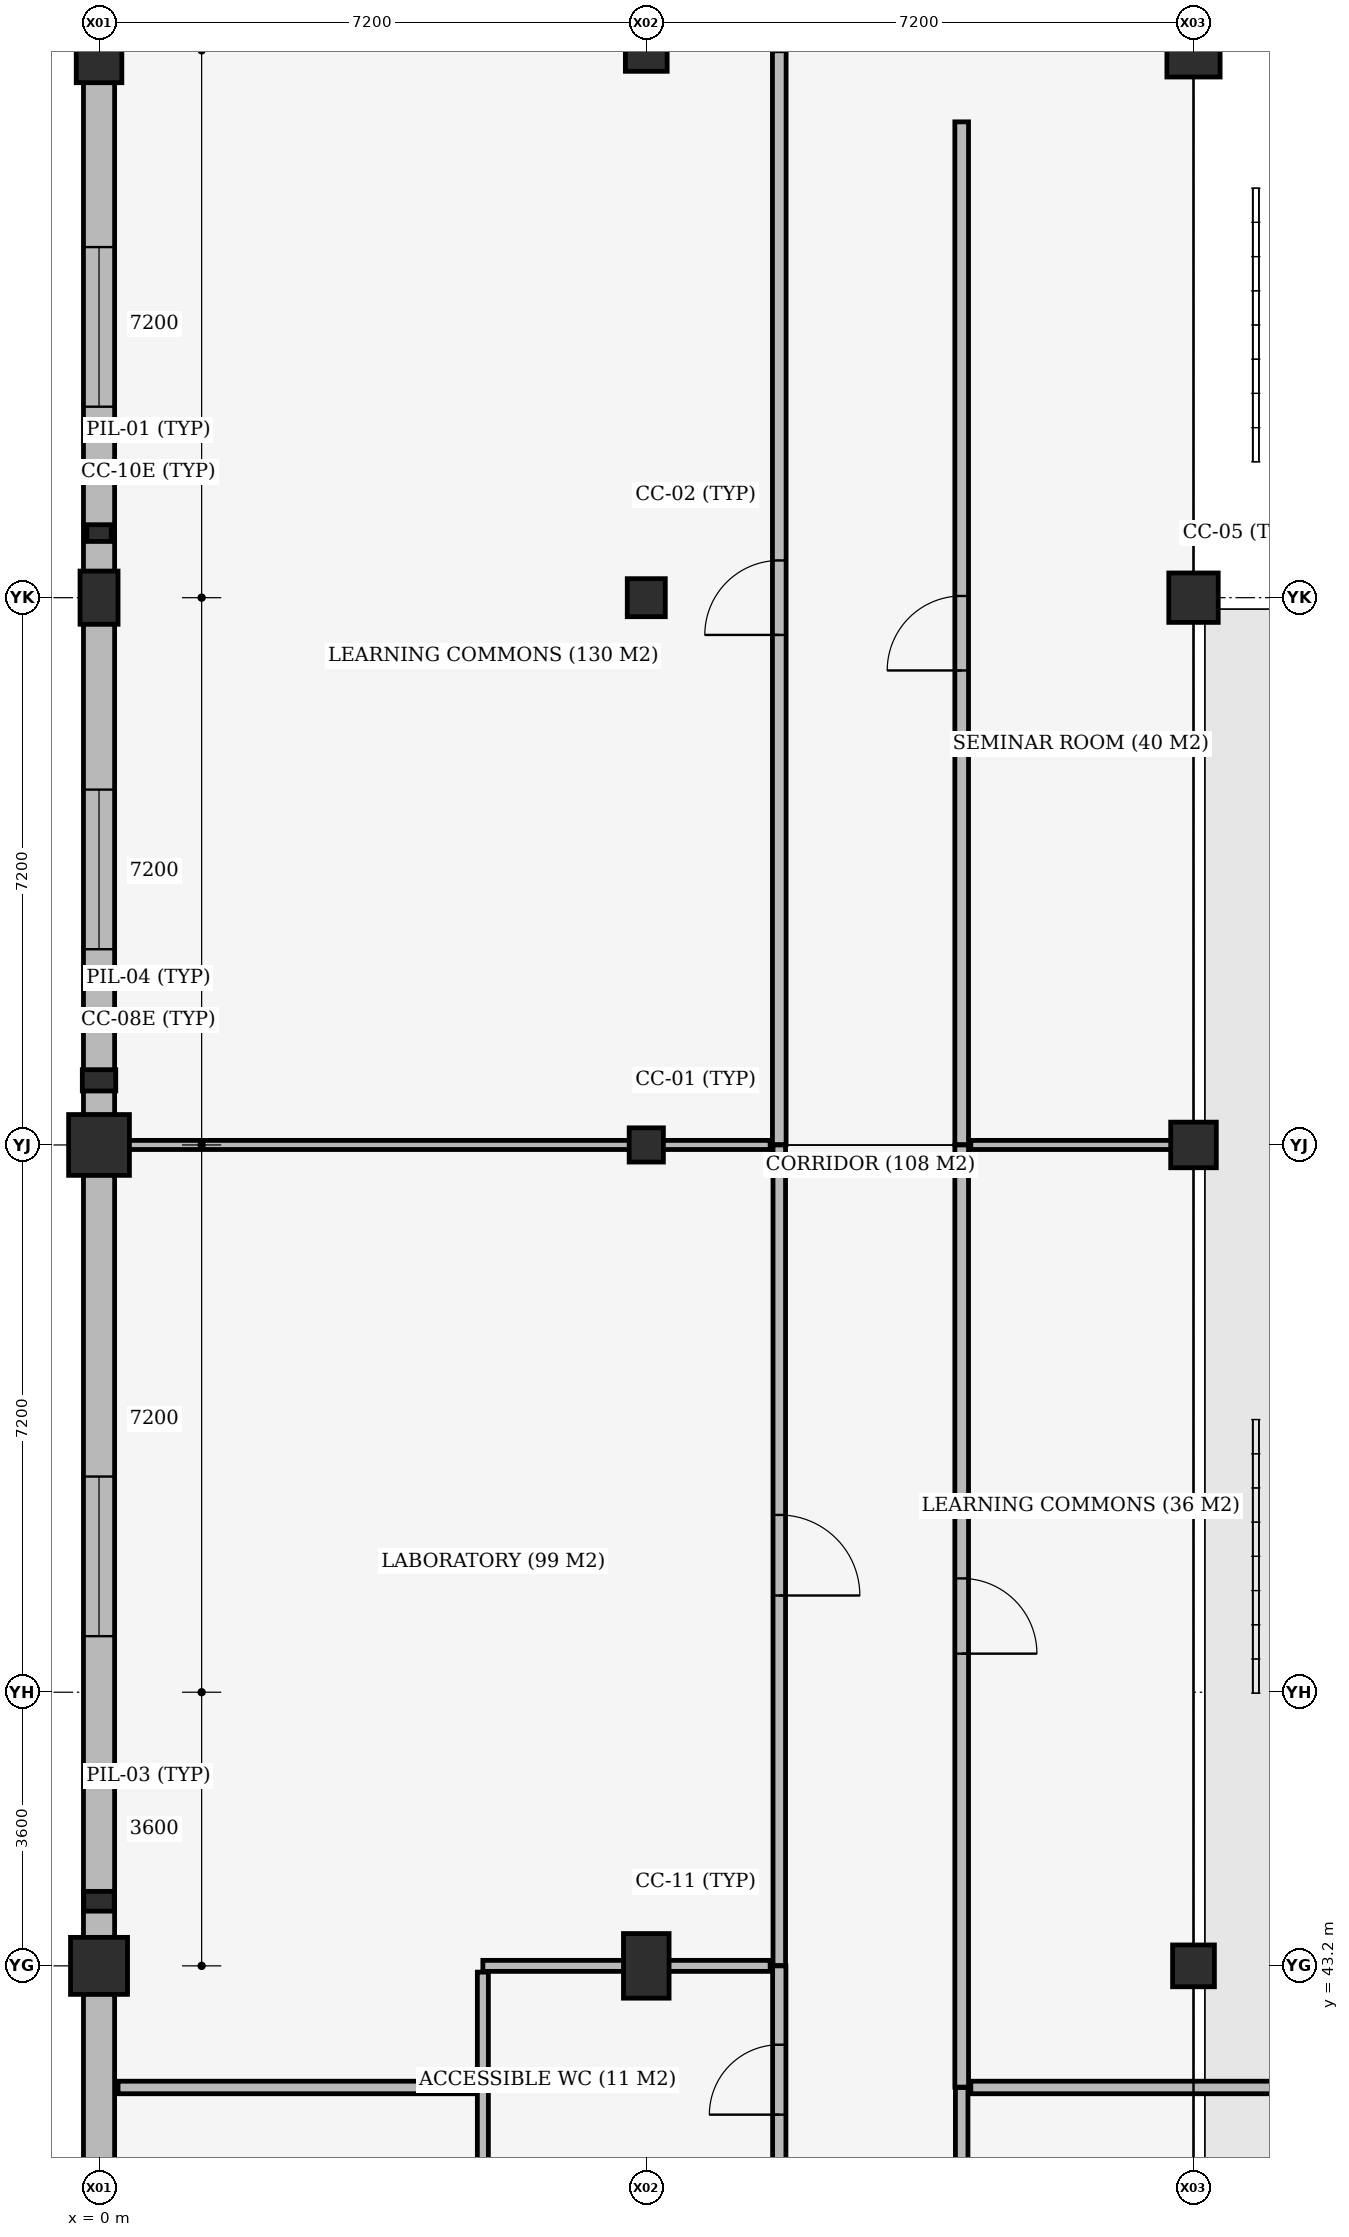
"""IFC4 building model, lengths in metres.
Left out: names, types, materials, properties, quantities, classifications, styles, units other than length and angle.
Written with IfcOpenShell. Run it as: python <this file> out.ifc"""

import sys

from ifc_helpers import new_model, si_unit, direction, frame, frame_2d, origin, origin_2d, place, context, subcontext, project, spatial, rectangle, extrude, element, fill, save


model = new_model("IFC4")
c1 = context("Model", 3, precision=1e-05, world=origin(), true_north=direction((0.0, 1.0)))
c2 = subcontext(c1, "Body", "Model", "MODEL_VIEW")
j1 = project(units=[si_unit("LENGTHUNIT", "METRE"), si_unit("PLANEANGLEUNIT", "RADIAN")], contexts=[c1])
p1 = place(None, origin())
s1 = spatial("IfcSite", under=j1, at=p1, CompositionType="ELEMENT")
p2 = place(p1, origin())
s2 = spatial("IfcBuilding", under=s1, at=p2, CompositionType="ELEMENT")
p3 = place(p2, origin())
s3 = spatial("IfcBuildingStorey", under=s2, at=p3, CompositionType="ELEMENT", Elevation=0.0)
p4 = place(p3, frame((0.0, 43.2, 0.0), z_axis=(0.0, 0.0, 1.0), x_axis=(1.0, 0.0, 0.0)))
e1 = element("IfcColumn", 1, at=p4, inside=s3, PredefinedType="COLUMN", context=c2, shape_type="SweptSolid", body=[
    extrude(rectangle(XDim=0.75, YDim=0.75, at=origin_2d()), origin(), (0.0, 0.0, 1.0), 5.1),
])
p5 = place(p3, frame((0.0, 54.0, 0.0), z_axis=(0.0, 0.0, 1.0), x_axis=(1.0, 0.0, 0.0)))
e2 = element("IfcColumn", 2, at=p5, inside=s3, PredefinedType="COLUMN", context=c2, shape_type="SweptSolid", body=[
    extrude(rectangle(XDim=0.8, YDim=0.8, at=origin_2d()), origin(), (0.0, 0.0, 1.0), 5.1),
])
p6 = place(p3, frame((0.0, 61.2, 0.0), z_axis=(0.0, 0.0, 1.0), x_axis=(1.0, 0.0, 0.0)))
e3 = element("IfcColumn", 3, at=p6, inside=s3, PredefinedType="COLUMN", context=c2, shape_type="SweptSolid", body=[
    extrude(rectangle(XDim=0.5, YDim=0.7, at=origin_2d()), origin(), (0.0, 0.0, 1.0), 5.1),
])
for number, where, z_axis, x_axis in (
    (4, (0.0, 68.4, 0.0), (0.0, 0.0, 1.0), (1.0, 0.0, 0.0)),
    (5, (7.2, 43.2, 0.0), (0.0, 0.0, 1.0), (1.0, 0.0, 0.0)),
):
    element("IfcColumn", number, at=place(p3, frame(where, z_axis=z_axis, x_axis=x_axis)), inside=s3, PredefinedType="COLUMN", context=c2, shape_type="SweptSolid", body=[
        extrude(rectangle(XDim=0.6, YDim=0.85, at=origin_2d()), origin(), (0.0, 0.0, 1.0), 5.1),
    ])
p7 = place(p3, frame((7.2, 54.0, 0.0), z_axis=(0.0, 0.0, 1.0), x_axis=(1.0, 0.0, 0.0)))
e6 = element("IfcColumn", 6, at=p7, inside=s3, PredefinedType="COLUMN", context=c2, shape_type="SweptSolid", body=[
    extrude(rectangle(XDim=0.45, YDim=0.45, at=origin_2d()), origin(), (0.0, 0.0, 1.0), 5.1),
])
p8 = place(p3, frame((7.2, 61.2, 0.0), z_axis=(0.0, 0.0, 1.0), x_axis=(1.0, 0.0, 0.0)))
e7 = element("IfcColumn", 7, at=p8, inside=s3, PredefinedType="COLUMN", context=c2, shape_type="SweptSolid", body=[
    extrude(rectangle(XDim=0.5, YDim=0.5, at=origin_2d()), origin(), (0.0, 0.0, 1.0), 5.1),
])
for number, where, z_axis, x_axis in (
    (8, (7.2, 68.4, 0.0), (0.0, 0.0, 1.0), (1.0, 0.0, 0.0)),
    (9, (14.4, 43.2, 0.0), (0.0, 0.0, 1.0), (1.0, 0.0, 0.0)),
):
    element("IfcColumn", number, at=place(p3, frame(where, z_axis=z_axis, x_axis=x_axis)), inside=s3, PredefinedType="COLUMN", context=c2, shape_type="SweptSolid", body=[
        extrude(rectangle(XDim=0.55, YDim=0.55, at=origin_2d()), origin(), (0.0, 0.0, 1.0), 5.1),
    ])
p9 = place(p3, frame((14.4, 54.0, 0.0), z_axis=(0.0, 0.0, 1.0), x_axis=(1.0, 0.0, 0.0)))
e10 = element("IfcColumn", 10, at=p9, inside=s3, PredefinedType="COLUMN", context=c2, shape_type="SweptSolid", body=[
    extrude(rectangle(XDim=0.6, YDim=0.6, at=origin_2d()), origin(), (0.0, 0.0, 1.0), 5.1),
])
p10 = place(p3, frame((14.4, 61.2, 0.0), z_axis=(0.0, 0.0, 1.0), x_axis=(1.0, 0.0, 0.0)))
e11 = element("IfcColumn", 11, at=p10, inside=s3, PredefinedType="COLUMN", context=c2, shape_type="SweptSolid", body=[
    extrude(rectangle(XDim=0.65, YDim=0.65, at=origin_2d()), origin(), (0.0, 0.0, 1.0), 5.1),
])
p11 = place(p3, frame((14.4, 68.4, 0.0), z_axis=(0.0, 0.0, 1.0), x_axis=(1.0, 0.0, 0.0)))
e12 = element("IfcColumn", 12, at=p11, inside=s3, PredefinedType="COLUMN", context=c2, shape_type="SweptSolid", body=[
    extrude(rectangle(XDim=0.7, YDim=0.7, at=origin_2d()), origin(), (0.0, 0.0, 1.0), 5.1),
])
p12 = place(p3, frame((0.0, 44.05, 0.0), z_axis=(0.0, 0.0, 1.0), x_axis=(1.0, 0.0, 0.0)))
e13 = element("IfcColumn", 13, at=p12, inside=s3, PredefinedType="PILASTER", context=c2, shape_type="SweptSolid", body=[
    extrude(rectangle(XDim=0.4, YDim=0.26, at=origin_2d()), origin(), (0.0, 0.0, 1.0), 5.1),
])
p13 = place(p3, frame((0.0, 54.85, 0.0), z_axis=(0.0, 0.0, 1.0), x_axis=(1.0, 0.0, 0.0)))
e14 = element("IfcColumn", 14, at=p13, inside=s3, PredefinedType="PILASTER", context=c2, shape_type="SweptSolid", body=[
    extrude(rectangle(XDim=0.44, YDim=0.28, at=origin_2d()), origin(), (0.0, 0.0, 1.0), 5.1),
])
p14 = place(p3, frame((0.0, 62.05, 0.0), z_axis=(0.0, 0.0, 1.0), x_axis=(1.0, 0.0, 0.0)))
e15 = element("IfcColumn", 15, at=p14, inside=s3, PredefinedType="PILASTER", context=c2, shape_type="SweptSolid", body=[
    extrude(rectangle(XDim=0.32, YDim=0.22, at=origin_2d()), origin(), (0.0, 0.0, 1.0), 5.1),
])
p15 = place(p3, frame((0.0, 36.342, 0.0), z_axis=(0.0, 0.0, 1.0), x_axis=(0.0, 1.0, 0.0)))
e16 = element("IfcWall", 16, at=p15, inside=s3, PredefinedType="STANDARD", context=c2, shape_type="SweptSolid", body=[
    extrude(rectangle(XDim=6.491, YDim=0.41, at=frame_2d((3.246, 0.0))), origin(), (0.0, 0.0, 1.0), 4.3),
])
p16 = place(p15, frame((2.196, 0.0, 0.8)))
e17 = element("IfcOpeningElement", 17, at=p16, cuts=e16, PredefinedType="OPENING", context=c2, shape_type="SweptSolid", body=[
    extrude(rectangle(XDim=2.1, YDim=3.0, at=frame_2d((1.05, 1.5))), frame((0.0, 0.215, 0.0), z_axis=(0.0, -1.0, 0.0), x_axis=(1.0, 0.0, 0.0)), (0.0, 0.0, 1.0), 0.43),
])
p17 = place(p3, frame((0.0, 43.567, 0.0), z_axis=(0.0, 0.0, 1.0), x_axis=(0.0, 1.0, 0.0)))
e18 = element("IfcWall", 18, at=p17, inside=s3, PredefinedType="STANDARD", context=c2, shape_type="SweptSolid", body=[
    extrude(rectangle(XDim=10.041, YDim=0.41, at=frame_2d((5.021, 0.0))), origin(), (0.0, 0.0, 1.0), 4.5),
])
p18 = place(p17, frame((3.97, 0.0, 0.8)))
e19 = element("IfcOpeningElement", 19, at=p18, cuts=e18, PredefinedType="OPENING", context=c2, shape_type="SweptSolid", body=[
    extrude(rectangle(XDim=2.1, YDim=3.0, at=frame_2d((1.05, 1.5))), frame((0.0, 0.215, 0.0), z_axis=(0.0, -1.0, 0.0), x_axis=(1.0, 0.0, 0.0)), (0.0, 0.0, 1.0), 0.43),
])
p19 = place(p3, frame((0.0, 54.392, 0.0), z_axis=(0.0, 0.0, 1.0), x_axis=(0.0, 1.0, 0.0)))
e20 = element("IfcWall", 20, at=p19, inside=s3, PredefinedType="STANDARD", context=c2, shape_type="SweptSolid", body=[
    extrude(rectangle(XDim=6.466, YDim=0.41, at=frame_2d((3.233, 0.0))), origin(), (0.0, 0.0, 1.0), 4.45),
])
p20 = place(p19, frame((2.183, 0.0, 0.8)))
e21 = element("IfcOpeningElement", 21, at=p20, cuts=e20, PredefinedType="OPENING", context=c2, shape_type="SweptSolid", body=[
    extrude(rectangle(XDim=2.1, YDim=3.0, at=frame_2d((1.05, 1.5))), frame((0.0, 0.215, 0.0), z_axis=(0.0, -1.0, 0.0), x_axis=(1.0, 0.0, 0.0)), (0.0, 0.0, 1.0), 0.43),
])
p21 = place(p3, frame((0.0, 61.542, 0.0), z_axis=(0.0, 0.0, 1.0), x_axis=(0.0, 1.0, 0.0)))
e22 = element("IfcWall", 22, at=p21, inside=s3, PredefinedType="STANDARD", context=c2, shape_type="SweptSolid", body=[
    extrude(rectangle(XDim=6.441, YDim=0.41, at=frame_2d((3.22, 0.0))), origin(), (0.0, 0.0, 1.0), 4.4),
])
p22 = place(p21, frame((2.17, 0.0, 0.8)))
e23 = element("IfcOpeningElement", 23, at=p22, cuts=e22, PredefinedType="OPENING", context=c2, shape_type="SweptSolid", body=[
    extrude(rectangle(XDim=2.1, YDim=3.0, at=frame_2d((1.05, 1.5))), frame((0.0, 0.215, 0.0), z_axis=(0.0, -1.0, 0.0), x_axis=(1.0, 0.0, 0.0)), (0.0, 0.0, 1.0), 0.43),
])
p23 = place(p3, frame((8.95, 40.205, 0.0), z_axis=(0.0, 0.0, 1.0), x_axis=(0.0, 1.0, 0.0)))
e24 = element("IfcWall", 24, at=p23, inside=s3, PredefinedType="PLUMBINGWALL", context=c2, shape_type="SweptSolid", body=[
    extrude(rectangle(XDim=2.995, YDim=0.175, at=frame_2d((1.498, 0.0))), origin(), (0.0, 0.0, 1.0), 4.3),
])
p24 = place(p23, frame((1.038, 0.0, 0.0)))
e25 = element("IfcOpeningElement", 25, at=p24, cuts=e24, PredefinedType="OPENING", context=c2, shape_type="SweptSolid", body=[
    extrude(rectangle(XDim=0.92, YDim=2.1, at=frame_2d((0.46, 1.05))), frame((0.0, 0.097, 0.0), z_axis=(0.0, -1.0, 0.0), x_axis=(1.0, 0.0, 0.0)), (0.0, 0.0, 1.0), 0.195),
])
p25 = place(p3, frame((5.05, 43.2, 0.0), z_axis=(0.0, 0.0, 1.0), x_axis=(1.0, 0.0, 0.0)))
e26 = element("IfcWall", 26, at=p25, inside=s3, PredefinedType="PLUMBINGWALL", context=c2, shape_type="SweptSolid", body=[
    extrude(rectangle(XDim=3.78, YDim=0.145, at=frame_2d((1.89, 0.0))), origin(), (0.0, 0.0, 1.0), 4.3),
])
p26 = place(p3, frame((5.05, 40.282, 0.0), z_axis=(0.0, 0.0, 1.0), x_axis=(0.0, 1.0, 0.0)))
e27 = element("IfcWall", 27, at=p26, inside=s3, PredefinedType="PLUMBINGWALL", context=c2, shape_type="SweptSolid", body=[
    extrude(rectangle(XDim=2.835, YDim=0.145, at=frame_2d((1.417, 0.0))), origin(), (0.0, 0.0, 1.0), 4.35),
])
p27 = place(p3, frame((0.25, 41.6, 0.0), z_axis=(0.0, 0.0, 1.0), x_axis=(1.0, 0.0, 0.0)))
e28 = element("IfcWall", 28, at=p27, inside=s3, PredefinedType="PARTITIONING", context=c2, shape_type="SweptSolid", body=[
    extrude(rectangle(XDim=4.718, YDim=0.165, at=frame_2d((2.359, 0.0))), origin(), (0.0, 0.0, 1.0), 4.65),
])
p28 = place(p3, frame((8.95, 43.205, 0.0), z_axis=(0.0, 0.0, 1.0), x_axis=(0.0, 1.0, 0.0)))
e29 = element("IfcWall", 29, at=p28, inside=s3, PredefinedType="PARTITIONING", context=c2, shape_type="SweptSolid", body=[
    extrude(rectangle(XDim=10.795, YDim=0.165, at=frame_2d((5.397, 0.0))), origin(), (0.0, 0.0, 1.0), 4.3),
])
p29 = place(p28, frame((4.867, 0.0, 0.0)))
e30 = element("IfcOpeningElement", 30, at=p29, cuts=e29, PredefinedType="OPENING", context=c2, shape_type="SweptSolid", body=[
    extrude(rectangle(XDim=1.06, YDim=2.2, at=frame_2d((0.53, 1.1))), frame((0.0, 0.093, 0.0), z_axis=(0.0, -1.0, 0.0), x_axis=(1.0, 0.0, 0.0)), (0.0, 0.0, 1.0), 0.185),
])
p30 = place(p3, frame((0.25, 54.0, 0.0), z_axis=(0.0, 0.0, 1.0), x_axis=(1.0, 0.0, 0.0)))
e31 = element("IfcWall", 31, at=p30, inside=s3, PredefinedType="PARTITIONING", context=c2, shape_type="SweptSolid", body=[
    extrude(rectangle(XDim=8.58, YDim=0.12, at=frame_2d((4.29, 0.0))), origin(), (0.0, 0.0, 1.0), 4.35),
])
p31 = place(p3, frame((8.95, 54.005, 0.0), z_axis=(0.0, 0.0, 1.0), x_axis=(0.0, 1.0, 0.0)))
e32 = element("IfcWall", 32, at=p31, inside=s3, PredefinedType="PARTITIONING", context=c2, shape_type="SweptSolid", body=[
    extrude(rectangle(XDim=14.39, YDim=0.18, at=frame_2d((7.195, 0.0))), origin(), (0.0, 0.0, 1.0), 4.35),
])
p32 = place(p31, frame((6.705, 0.0, 0.0)))
e33 = element("IfcOpeningElement", 33, at=p32, cuts=e32, PredefinedType="OPENING", context=c2, shape_type="SweptSolid", body=[
    extrude(rectangle(XDim=0.98, YDim=2.18, at=frame_2d((0.49, 1.09))), frame((0.0, 0.1, 0.0), z_axis=(0.0, -1.0, 0.0), x_axis=(1.0, 0.0, 0.0)), (0.0, 0.0, 1.0), 0.2),
])
p33 = place(p3, frame((11.35, 23.0, 0.0), z_axis=(0.0, 0.0, 1.0), x_axis=(0.0, 1.0, 0.0)))
e34 = element("IfcWall", 34, at=p33, inside=s3, PredefinedType="PARTITIONING", context=c2, shape_type="SweptSolid", body=[
    extrude(rectangle(XDim=18.6, YDim=0.165, at=frame_2d((9.3, 0.0))), origin(), (0.0, 0.0, 1.0), 4.35),
])
p34 = place(p33, frame((8.775, 0.0, 0.0)))
e35 = element("IfcOpeningElement", 35, at=p34, cuts=e34, PredefinedType="OPENING", context=c2, shape_type="SweptSolid", body=[
    extrude(rectangle(XDim=1.05, YDim=2.2, at=frame_2d((0.525, 1.1))), frame((0.0, 0.093, 0.0), z_axis=(0.0, -1.0, 0.0), x_axis=(1.0, 0.0, 0.0)), (0.0, 0.0, 1.0), 0.185),
])
p35 = place(p3, frame((11.47, 41.6, 0.0), z_axis=(0.0, 0.0, 1.0), x_axis=(1.0, 0.0, 0.0)))
e36 = element("IfcWall", 36, at=p35, inside=s3, PredefinedType="PARTITIONING", context=c2, shape_type="SweptSolid", body=[
    extrude(rectangle(XDim=18.91, YDim=0.165, at=frame_2d((9.455, 0.0))), origin(), (0.0, 0.0, 1.0), 4.4),
])
p36 = place(p3, frame((11.35, 41.605, 0.0), z_axis=(0.0, 0.0, 1.0), x_axis=(0.0, 1.0, 0.0)))
e37 = element("IfcWall", 37, at=p36, inside=s3, PredefinedType="PARTITIONING", context=c2, shape_type="SweptSolid", body=[
    extrude(rectangle(XDim=12.395, YDim=0.18, at=frame_2d((6.198, 0.0))), origin(), (0.0, 0.0, 1.0), 4.3),
])
p37 = place(p36, frame((5.702, 0.0, 0.0)))
e38 = element("IfcOpeningElement", 38, at=p37, cuts=e37, PredefinedType="OPENING", context=c2, shape_type="SweptSolid", body=[
    extrude(rectangle(XDim=0.99, YDim=2.18, at=frame_2d((0.495, 1.09))), frame((0.0, 0.1, 0.0), z_axis=(0.0, -1.0, 0.0), x_axis=(1.0, 0.0, 0.0)), (0.0, 0.0, 1.0), 0.2),
])
p38 = place(p3, frame((11.47, 54.0, 0.0), z_axis=(0.0, 0.0, 1.0), x_axis=(1.0, 0.0, 0.0)))
e39 = element("IfcWall", 39, at=p38, inside=s3, PredefinedType="PARTITIONING", context=c2, shape_type="SweptSolid", body=[
    extrude(rectangle(XDim=3.01, YDim=0.12, at=frame_2d((1.505, 0.0))), origin(), (0.0, 0.0, 1.0), 4.3),
])
p39 = place(p3, frame((11.35, 54.005, 0.0), z_axis=(0.0, 0.0, 1.0), x_axis=(0.0, 1.0, 0.0)))
e40 = element("IfcWall", 40, at=p39, inside=s3, PredefinedType="PARTITIONING", context=c2, shape_type="SweptSolid", body=[
    extrude(rectangle(XDim=13.455, YDim=0.18, at=frame_2d((6.728, 0.0))), origin(), (0.0, 0.0, 1.0), 4.35),
])
p40 = place(p39, frame((6.238, 0.0, 0.0)))
e41 = element("IfcOpeningElement", 41, at=p40, cuts=e40, PredefinedType="OPENING", context=c2, shape_type="SweptSolid", body=[
    extrude(rectangle(XDim=0.98, YDim=2.18, at=frame_2d((0.49, 1.09))), frame((0.0, 0.1, 0.0), z_axis=(0.0, -1.0, 0.0), x_axis=(1.0, 0.0, 0.0)), (0.0, 0.0, 1.0), 0.2),
])
p41 = place(p18, origin())
e42 = element("IfcWindow", 42, at=p41, inside=s3, PartitioningType="DOUBLE_PANEL_VERTICAL", PredefinedType="WINDOW", context=c2, shape_type="SweptSolid", body=[
    extrude(rectangle(XDim=2.1, YDim=3.0, at=frame_2d((1.05, 1.5))), frame((0.0, 0.03, 0.0), z_axis=(0.0, -1.0, 0.0), x_axis=(1.0, 0.0, 0.0)), (0.0, 0.0, 1.0), 0.06),
])
fill(e19, e42)
p42 = place(p20, origin())
e43 = element("IfcWindow", 43, at=p42, inside=s3, PartitioningType="DOUBLE_PANEL_VERTICAL", PredefinedType="WINDOW", context=c2, shape_type="SweptSolid", body=[
    extrude(rectangle(XDim=2.1, YDim=3.0, at=frame_2d((1.05, 1.5))), frame((0.0, 0.03, 0.0), z_axis=(0.0, -1.0, 0.0), x_axis=(1.0, 0.0, 0.0)), (0.0, 0.0, 1.0), 0.06),
])
fill(e21, e43)
p43 = place(p22, origin())
e44 = element("IfcWindow", 44, at=p43, inside=s3, PartitioningType="DOUBLE_PANEL_VERTICAL", PredefinedType="WINDOW", context=c2, shape_type="SweptSolid", body=[
    extrude(rectangle(XDim=2.1, YDim=3.0, at=frame_2d((1.05, 1.5))), frame((0.0, 0.03, 0.0), z_axis=(0.0, -1.0, 0.0), x_axis=(1.0, 0.0, 0.0)), (0.0, 0.0, 1.0), 0.06),
])
fill(e23, e44)
p44 = place(p24, origin())
e45 = element("IfcDoor", 45, at=p44, inside=s3, OperationType="SINGLE_SWING_LEFT", PredefinedType="DOOR", context=c2, shape_type="SweptSolid", body=[
    extrude(rectangle(XDim=0.92, YDim=2.1, at=frame_2d((0.46, 1.05))), frame((0.0, 0.025, 0.0), z_axis=(0.0, -1.0, 0.0), x_axis=(1.0, 0.0, 0.0)), (0.0, 0.0, 1.0), 0.05),
])
fill(e25, e45)
p45 = place(p29, origin())
e46 = element("IfcDoor", 46, at=p45, inside=s3, OperationType="SINGLE_SWING_RIGHT", PredefinedType="DOOR", context=c2, shape_type="SweptSolid", body=[
    extrude(rectangle(XDim=1.06, YDim=2.2, at=frame_2d((0.53, 1.1))), frame((0.0, 0.025, 0.0), z_axis=(0.0, -1.0, 0.0), x_axis=(1.0, 0.0, 0.0)), (0.0, 0.0, 1.0), 0.05),
])
fill(e30, e46)
p46 = place(p32, origin())
e47 = element("IfcDoor", 47, at=p46, inside=s3, OperationType="SINGLE_SWING_LEFT", PredefinedType="DOOR", context=c2, shape_type="SweptSolid", body=[
    extrude(rectangle(XDim=0.98, YDim=2.18, at=frame_2d((0.49, 1.09))), frame((0.0, 0.025, 0.0), z_axis=(0.0, -1.0, 0.0), x_axis=(1.0, 0.0, 0.0)), (0.0, 0.0, 1.0), 0.05),
])
fill(e33, e47)
p47 = place(p37, origin())
e48 = element("IfcDoor", 48, at=p47, inside=s3, OperationType="SINGLE_SWING_RIGHT", PredefinedType="DOOR", context=c2, shape_type="SweptSolid", body=[
    extrude(rectangle(XDim=0.99, YDim=2.18, at=frame_2d((0.495, 1.09))), frame((0.0, 0.025, 0.0), z_axis=(0.0, -1.0, 0.0), x_axis=(1.0, 0.0, 0.0)), (0.0, 0.0, 1.0), 0.05),
])
fill(e38, e48)
p48 = place(p40, origin())
e49 = element("IfcDoor", 49, at=p48, inside=s3, OperationType="SINGLE_SWING_LEFT", PredefinedType="DOOR", context=c2, shape_type="SweptSolid", body=[
    extrude(rectangle(XDim=0.98, YDim=2.18, at=frame_2d((0.49, 1.09))), frame((0.0, 0.025, 0.0), z_axis=(0.0, -1.0, 0.0), x_axis=(1.0, 0.0, 0.0)), (0.0, 0.0, 1.0), 0.05),
])
fill(e41, e49)
save(model, sys.argv[1])
